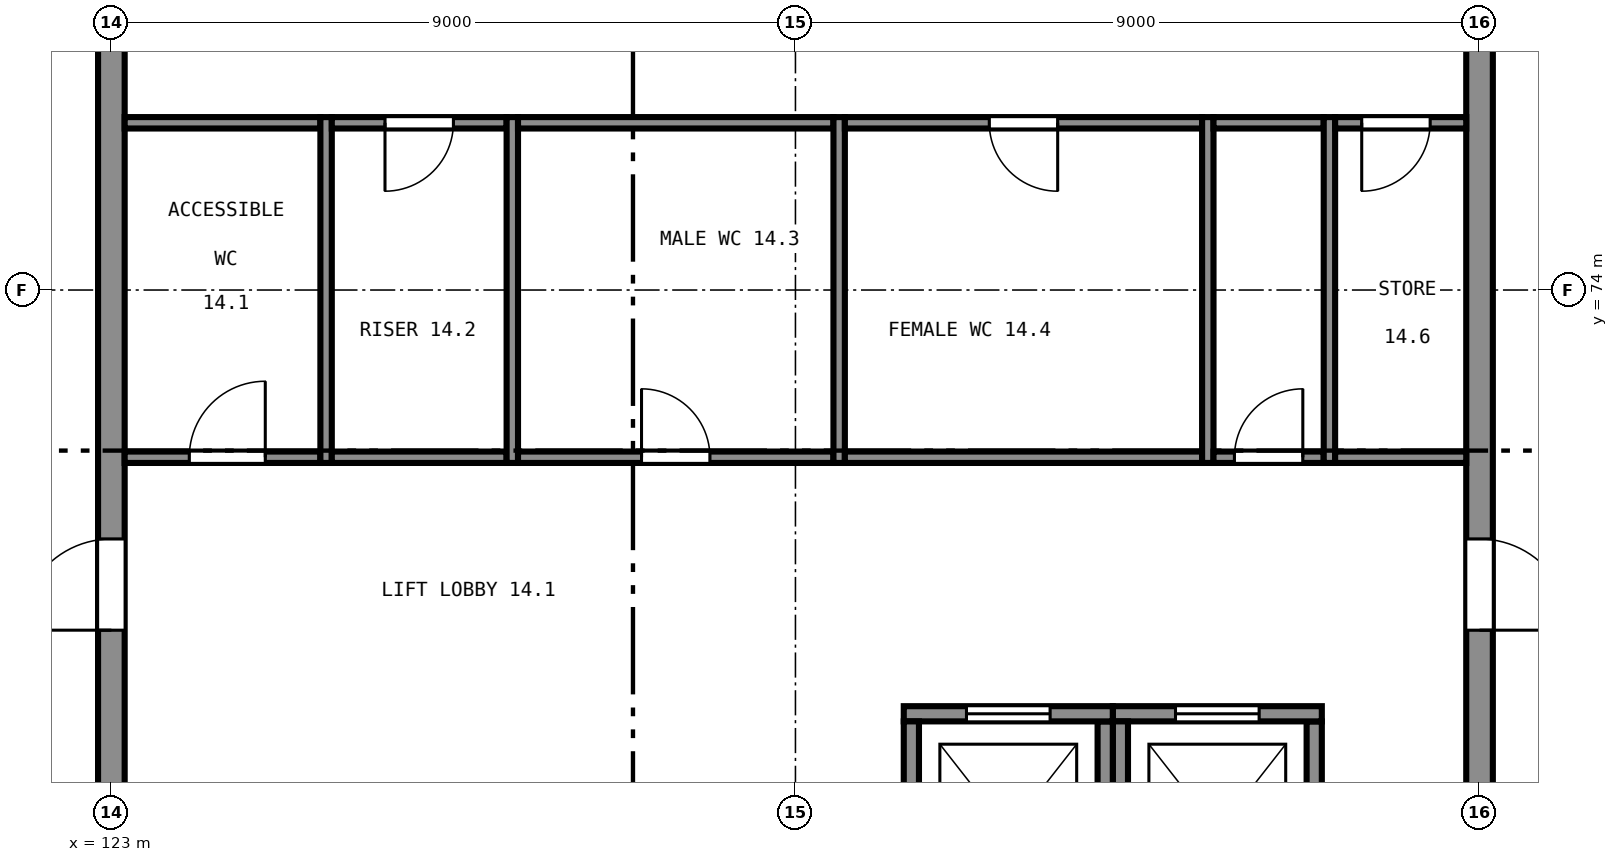
"""IFC4 building model, lengths in metres.
Left out: names, types, materials, properties, quantities, classifications, styles, units other than length and angle.
Written with IfcOpenShell. Run it as: python <this file> out.ifc"""

import sys

from ifc_helpers import new_model, si_unit, direction, frame, frame_2d, origin, place, context, subcontext, project, spatial, rectangle, extrude, element, fill, save


model = new_model("IFC4")
c1 = context("Model", 3, precision=1e-05, world=origin(), true_north=direction((0.0, 1.0)))
c2 = subcontext(c1, "Body", "Model", "MODEL_VIEW")
j1 = project(units=[si_unit("LENGTHUNIT", "METRE"), si_unit("PLANEANGLEUNIT", "RADIAN")], contexts=[c1])
p1 = place(None, origin())
s1 = spatial("IfcSite", under=j1, at=p1, CompositionType="ELEMENT")
p2 = place(p1, origin())
s2 = spatial("IfcBuilding", under=s1, at=p2, CompositionType="ELEMENT")
p3 = place(p2, frame((0.0, 0.0, 57.5)))
s3 = spatial("IfcBuildingStorey", under=s2, at=p3, CompositionType="ELEMENT", Elevation=57.5)
p4 = place(p3, frame((141.0, 65.175, 0.0), z_axis=(0.0, 0.0, 1.0), x_axis=(0.0, 1.0, 0.0)))
e1 = element("IfcWall", 1, at=p4, inside=s3, PredefinedType="SHEAR", context=c2, shape_type="SweptSolid", body=[
    extrude(rectangle(XDim=17.65, YDim=0.35, at=frame_2d((8.825, 0.0))), origin(), (0.0, 0.0, 1.0), 4.0),
])
p5 = place(p4, frame((4.35, 0.0, 0.0)))
e2 = element("IfcOpeningElement", 2, at=p5, cuts=e1, PredefinedType="OPENING", context=c2, shape_type="SweptSolid", body=[
    extrude(rectangle(XDim=1.2, YDim=2.1, at=frame_2d((0.6, 1.05))), frame((0.0, 0.185, 0.0), z_axis=(0.0, -1.0, 0.0), x_axis=(1.0, 0.0, 0.0)), (0.0, 0.0, 1.0), 0.37),
])
p6 = place(p4, frame((12.1, 0.0, 0.0)))
e3 = element("IfcOpeningElement", 3, at=p6, cuts=e1, PredefinedType="OPENING", context=c2, shape_type="SweptSolid", body=[
    extrude(rectangle(XDim=1.2, YDim=2.1, at=frame_2d((0.6, 1.05))), frame((0.0, 0.185, 0.0), z_axis=(0.0, -1.0, 0.0), x_axis=(1.0, 0.0, 0.0)), (0.0, 0.0, 1.0), 0.37),
])
p7 = place(p3, frame((123.0, 82.825, 0.0), z_axis=(0.0, 0.0, 1.0), x_axis=(0.0, -1.0, 0.0)))
e4 = element("IfcWall", 4, at=p7, inside=s3, PredefinedType="SHEAR", context=c2, shape_type="SweptSolid", body=[
    extrude(rectangle(XDim=17.65, YDim=0.35, at=frame_2d((8.825, 0.0))), origin(), (0.0, 0.0, 1.0), 4.0),
])
p8 = place(p7, frame((12.1, 0.0, 0.0)))
e5 = element("IfcOpeningElement", 5, at=p8, cuts=e4, PredefinedType="OPENING", context=c2, shape_type="SweptSolid", body=[
    extrude(rectangle(XDim=1.2, YDim=2.1, at=frame_2d((0.6, 1.05))), frame((0.0, 0.185, 0.0), z_axis=(0.0, -1.0, 0.0), x_axis=(1.0, 0.0, 0.0)), (0.0, 0.0, 1.0), 0.37),
])
p9 = place(p7, frame((4.35, 0.0, 0.0)))
e6 = element("IfcOpeningElement", 6, at=p9, cuts=e4, PredefinedType="OPENING", context=c2, shape_type="SweptSolid", body=[
    extrude(rectangle(XDim=1.2, YDim=2.1, at=frame_2d((0.6, 1.05))), frame((0.0, 0.185, 0.0), z_axis=(0.0, -1.0, 0.0), x_axis=(1.0, 0.0, 0.0)), (0.0, 0.0, 1.0), 0.37),
])
p10 = place(p3, frame((136.075, 65.425, 0.0), z_axis=(0.0, 0.0, 1.0), x_axis=(0.0, 1.0, 0.0)))
e7 = element("IfcWall", 7, at=p10, inside=s3, PredefinedType="SHEAR", context=c2, shape_type="SweptSolid", body=[
    extrude(rectangle(XDim=2.9, YDim=0.2, at=frame_2d((1.45, 0.0))), origin(), (0.0, 0.0, 1.0), 4.0),
])
p11 = place(p3, frame((136.175, 68.425, 0.0), z_axis=(0.0, 0.0, 1.0), x_axis=(-1.0, 0.0, 0.0)))
e8 = element("IfcWall", 8, at=p11, inside=s3, PredefinedType="SHEAR", context=c2, shape_type="SweptSolid", body=[
    extrude(rectangle(XDim=2.75, YDim=0.2, at=frame_2d((1.375, 0.0))), origin(), (0.0, 0.0, 1.0), 4.0),
])
p12 = place(p11, frame((0.825, 0.0, 0.0)))
e9 = element("IfcOpeningElement", 9, at=p12, cuts=e8, PredefinedType="OPENING", context=c2, shape_type="SweptSolid", body=[
    extrude(rectangle(XDim=1.1, YDim=2.1, at=frame_2d((0.55, 1.05))), frame((0.0, 0.11, 0.0), z_axis=(0.0, -1.0, 0.0), x_axis=(1.0, 0.0, 0.0)), (0.0, 0.0, 1.0), 0.22),
])
for number, where, z_axis, x_axis in (
    (10, (133.525, 68.325, 0.0), (0.0, 0.0, 1.0), (0.0, -1.0, 0.0)),
    (11, (138.825, 65.425, 0.0), (0.0, 0.0, 1.0), (0.0, 1.0, 0.0)),
):
    element("IfcWall", number, at=place(p3, frame(where, z_axis=z_axis, x_axis=x_axis)), inside=s3, PredefinedType="SHEAR", context=c2, shape_type="SweptSolid", body=[
        extrude(rectangle(XDim=2.9, YDim=0.2, at=frame_2d((1.45, 0.0))), origin(), (0.0, 0.0, 1.0), 4.0),
    ])
p13 = place(p3, frame((138.925, 68.425, 0.0), z_axis=(0.0, 0.0, 1.0), x_axis=(-1.0, 0.0, 0.0)))
e12 = element("IfcWall", 12, at=p13, inside=s3, PredefinedType="SHEAR", context=c2, shape_type="SweptSolid", body=[
    extrude(rectangle(XDim=2.75, YDim=0.2, at=frame_2d((1.375, 0.0))), origin(), (0.0, 0.0, 1.0), 4.0),
])
p14 = place(p13, frame((0.825, 0.0, 0.0)))
e13 = element("IfcOpeningElement", 13, at=p14, cuts=e12, PredefinedType="OPENING", context=c2, shape_type="SweptSolid", body=[
    extrude(rectangle(XDim=1.1, YDim=2.1, at=frame_2d((0.55, 1.05))), frame((0.0, 0.11, 0.0), z_axis=(0.0, -1.0, 0.0), x_axis=(1.0, 0.0, 0.0)), (0.0, 0.0, 1.0), 0.22),
])
p15 = place(p3, frame((136.275, 68.325, 0.0), z_axis=(0.0, 0.0, 1.0), x_axis=(0.0, -1.0, 0.0)))
e14 = element("IfcWall", 14, at=p15, inside=s3, PredefinedType="SHEAR", context=c2, shape_type="SweptSolid", body=[
    extrude(rectangle(XDim=2.9, YDim=0.2, at=frame_2d((1.45, 0.0))), origin(), (0.0, 0.0, 1.0), 4.0),
])
p16 = place(p3, frame((125.825, 71.725, 0.0), z_axis=(0.0, 0.0, 1.0), x_axis=(0.0, 1.0, 0.0)))
e15 = element("IfcWall", 15, at=p16, inside=s3, PredefinedType="PARTITIONING", context=c2, shape_type="SweptSolid", body=[
    extrude(rectangle(XDim=4.55, YDim=0.15, at=frame_2d((2.275, 0.0))), origin(), (0.0, 0.0, 1.0), 3.75),
])
p17 = place(p3, frame((123.175, 71.8, 0.0), z_axis=(0.0, 0.0, 1.0), x_axis=(1.0, 0.0, 0.0)))
e16 = element("IfcWall", 16, at=p17, inside=s3, PredefinedType="PARTITIONING", context=c2, shape_type="SweptSolid", body=[
    extrude(rectangle(XDim=2.575, YDim=0.15, at=frame_2d((1.288, 0.0))), origin(), (0.0, 0.0, 1.0), 3.75),
])
p18 = place(p17, frame((0.85, 0.0, 0.0)))
e17 = element("IfcOpeningElement", 17, at=p18, cuts=e16, PredefinedType="OPENING", context=c2, shape_type="SweptSolid", body=[
    extrude(rectangle(XDim=1.0, YDim=2.1, at=frame_2d((0.5, 1.05))), frame((0.0, 0.085, 0.0), z_axis=(0.0, -1.0, 0.0), x_axis=(1.0, 0.0, 0.0)), (0.0, 0.0, 1.0), 0.17),
])
p19 = place(p3, frame((123.175, 76.2, 0.0), z_axis=(0.0, 0.0, 1.0), x_axis=(1.0, 0.0, 0.0)))
e18 = element("IfcWall", 18, at=p19, inside=s3, PredefinedType="PARTITIONING", context=c2, shape_type="SweptSolid", body=[
    extrude(rectangle(XDim=2.575, YDim=0.15, at=frame_2d((1.288, 0.0))), origin(), (0.0, 0.0, 1.0), 3.75),
])
p20 = place(p3, frame((128.275, 71.725, 0.0), z_axis=(0.0, 0.0, 1.0), x_axis=(0.0, 1.0, 0.0)))
e19 = element("IfcWall", 19, at=p20, inside=s3, PredefinedType="PARTITIONING", context=c2, shape_type="SweptSolid", body=[
    extrude(rectangle(XDim=4.55, YDim=0.15, at=frame_2d((2.275, 0.0))), origin(), (0.0, 0.0, 1.0), 3.75),
])
p21 = place(p3, frame((125.9, 71.8, 0.0), z_axis=(0.0, 0.0, 1.0), x_axis=(1.0, 0.0, 0.0)))
e20 = element("IfcWall", 20, at=p21, inside=s3, PredefinedType="PARTITIONING", context=c2, shape_type="SweptSolid", body=[
    extrude(rectangle(XDim=2.3, YDim=0.15, at=frame_2d((1.15, 0.0))), origin(), (0.0, 0.0, 1.0), 3.75),
])
p22 = place(p3, frame((125.9, 76.2, 0.0), z_axis=(0.0, 0.0, 1.0), x_axis=(1.0, 0.0, 0.0)))
e21 = element("IfcWall", 21, at=p22, inside=s3, PredefinedType="PARTITIONING", context=c2, shape_type="SweptSolid", body=[
    extrude(rectangle(XDim=2.3, YDim=0.15, at=frame_2d((1.15, 0.0))), origin(), (0.0, 0.0, 1.0), 3.75),
])
p23 = place(p22, frame((0.7, 0.0, 0.0)))
e22 = element("IfcOpeningElement", 22, at=p23, cuts=e21, PredefinedType="OPENING", context=c2, shape_type="SweptSolid", body=[
    extrude(rectangle(XDim=0.9, YDim=2.1, at=frame_2d((0.45, 1.05))), frame((0.0, 0.085, 0.0), z_axis=(0.0, -1.0, 0.0), x_axis=(1.0, 0.0, 0.0)), (0.0, 0.0, 1.0), 0.17),
])
p24 = place(p3, frame((132.575, 71.725, 0.0), z_axis=(0.0, 0.0, 1.0), x_axis=(0.0, 1.0, 0.0)))
e23 = element("IfcWall", 23, at=p24, inside=s3, PredefinedType="PARTITIONING", context=c2, shape_type="SweptSolid", body=[
    extrude(rectangle(XDim=4.55, YDim=0.15, at=frame_2d((2.275, 0.0))), origin(), (0.0, 0.0, 1.0), 3.75),
])
p25 = place(p3, frame((128.35, 71.8, 0.0), z_axis=(0.0, 0.0, 1.0), x_axis=(1.0, 0.0, 0.0)))
e24 = element("IfcWall", 24, at=p25, inside=s3, PredefinedType="PARTITIONING", context=c2, shape_type="SweptSolid", body=[
    extrude(rectangle(XDim=4.15, YDim=0.15, at=frame_2d((2.075, 0.0))), origin(), (0.0, 0.0, 1.0), 3.75),
])
p26 = place(p25, frame((1.625, 0.0, 0.0)))
e25 = element("IfcOpeningElement", 25, at=p26, cuts=e24, PredefinedType="OPENING", context=c2, shape_type="SweptSolid", body=[
    extrude(rectangle(XDim=0.9, YDim=2.1, at=frame_2d((0.45, 1.05))), frame((0.0, 0.085, 0.0), z_axis=(0.0, -1.0, 0.0), x_axis=(1.0, 0.0, 0.0)), (0.0, 0.0, 1.0), 0.17),
])
p27 = place(p3, frame((128.35, 76.2, 0.0), z_axis=(0.0, 0.0, 1.0), x_axis=(1.0, 0.0, 0.0)))
e26 = element("IfcWall", 26, at=p27, inside=s3, PredefinedType="PARTITIONING", context=c2, shape_type="SweptSolid", body=[
    extrude(rectangle(XDim=4.15, YDim=0.15, at=frame_2d((2.075, 0.0))), origin(), (0.0, 0.0, 1.0), 3.75),
])
p28 = place(p3, frame((137.425, 71.725, 0.0), z_axis=(0.0, 0.0, 1.0), x_axis=(0.0, 1.0, 0.0)))
e27 = element("IfcWall", 27, at=p28, inside=s3, PredefinedType="PARTITIONING", context=c2, shape_type="SweptSolid", body=[
    extrude(rectangle(XDim=4.55, YDim=0.15, at=frame_2d((2.275, 0.0))), origin(), (0.0, 0.0, 1.0), 3.75),
])
p29 = place(p3, frame((132.65, 71.8, 0.0), z_axis=(0.0, 0.0, 1.0), x_axis=(1.0, 0.0, 0.0)))
e28 = element("IfcWall", 28, at=p29, inside=s3, PredefinedType="PARTITIONING", context=c2, shape_type="SweptSolid", body=[
    extrude(rectangle(XDim=4.7, YDim=0.15, at=frame_2d((2.35, 0.0))), origin(), (0.0, 0.0, 1.0), 3.75),
])
p30 = place(p3, frame((132.65, 76.2, 0.0), z_axis=(0.0, 0.0, 1.0), x_axis=(1.0, 0.0, 0.0)))
e29 = element("IfcWall", 29, at=p30, inside=s3, PredefinedType="PARTITIONING", context=c2, shape_type="SweptSolid", body=[
    extrude(rectangle(XDim=4.7, YDim=0.15, at=frame_2d((2.35, 0.0))), origin(), (0.0, 0.0, 1.0), 3.75),
])
p31 = place(p30, frame((1.9, 0.0, 0.0)))
e30 = element("IfcOpeningElement", 30, at=p31, cuts=e29, PredefinedType="OPENING", context=c2, shape_type="SweptSolid", body=[
    extrude(rectangle(XDim=0.9, YDim=2.1, at=frame_2d((0.45, 1.05))), frame((0.0, 0.085, 0.0), z_axis=(0.0, -1.0, 0.0), x_axis=(1.0, 0.0, 0.0)), (0.0, 0.0, 1.0), 0.17),
])
p32 = place(p3, frame((139.025, 71.725, 0.0), z_axis=(0.0, 0.0, 1.0), x_axis=(0.0, 1.0, 0.0)))
e31 = element("IfcWall", 31, at=p32, inside=s3, PredefinedType="PARTITIONING", context=c2, shape_type="SweptSolid", body=[
    extrude(rectangle(XDim=4.55, YDim=0.15, at=frame_2d((2.275, 0.0))), origin(), (0.0, 0.0, 1.0), 3.75),
])
p33 = place(p3, frame((137.5, 71.8, 0.0), z_axis=(0.0, 0.0, 1.0), x_axis=(1.0, 0.0, 0.0)))
e32 = element("IfcWall", 32, at=p33, inside=s3, PredefinedType="PARTITIONING", context=c2, shape_type="SweptSolid", body=[
    extrude(rectangle(XDim=1.45, YDim=0.15, at=frame_2d((0.725, 0.0))), origin(), (0.0, 0.0, 1.0), 3.75),
])
p34 = place(p33, frame((0.275, 0.0, 0.0)))
e33 = element("IfcOpeningElement", 33, at=p34, cuts=e32, PredefinedType="OPENING", context=c2, shape_type="SweptSolid", body=[
    extrude(rectangle(XDim=0.9, YDim=2.1, at=frame_2d((0.45, 1.05))), frame((0.0, 0.085, 0.0), z_axis=(0.0, -1.0, 0.0), x_axis=(1.0, 0.0, 0.0)), (0.0, 0.0, 1.0), 0.17),
])
p35 = place(p3, frame((137.5, 76.2, 0.0), z_axis=(0.0, 0.0, 1.0), x_axis=(1.0, 0.0, 0.0)))
e34 = element("IfcWall", 34, at=p35, inside=s3, PredefinedType="PARTITIONING", context=c2, shape_type="SweptSolid", body=[
    extrude(rectangle(XDim=1.45, YDim=0.15, at=frame_2d((0.725, 0.0))), origin(), (0.0, 0.0, 1.0), 3.75),
])
p36 = place(p3, frame((139.1, 71.8, 0.0), z_axis=(0.0, 0.0, 1.0), x_axis=(1.0, 0.0, 0.0)))
e35 = element("IfcWall", 35, at=p36, inside=s3, PredefinedType="PARTITIONING", context=c2, shape_type="SweptSolid", body=[
    extrude(rectangle(XDim=1.725, YDim=0.15, at=frame_2d((0.862, 0.0))), origin(), (0.0, 0.0, 1.0), 3.75),
])
p37 = place(p3, frame((139.1, 76.2, 0.0), z_axis=(0.0, 0.0, 1.0), x_axis=(1.0, 0.0, 0.0)))
e36 = element("IfcWall", 36, at=p37, inside=s3, PredefinedType="PARTITIONING", context=c2, shape_type="SweptSolid", body=[
    extrude(rectangle(XDim=1.725, YDim=0.15, at=frame_2d((0.862, 0.0))), origin(), (0.0, 0.0, 1.0), 3.75),
])
p38 = place(p37, frame((0.35, 0.0, 0.0)))
e37 = element("IfcOpeningElement", 37, at=p38, cuts=e36, PredefinedType="OPENING", context=c2, shape_type="SweptSolid", body=[
    extrude(rectangle(XDim=0.9, YDim=2.1, at=frame_2d((0.45, 1.05))), frame((0.0, 0.085, 0.0), z_axis=(0.0, -1.0, 0.0), x_axis=(1.0, 0.0, 0.0)), (0.0, 0.0, 1.0), 0.17),
])
p39 = place(p12, origin())
e38 = element("IfcDoor", 38, at=p39, inside=s3, OperationType="SLIDING_TO_LEFT", PredefinedType="DOOR", context=c2, shape_type="SweptSolid", body=[
    extrude(rectangle(XDim=1.1, YDim=2.1, at=frame_2d((0.55, 1.05))), frame((0.0, 0.025, 0.0), z_axis=(0.0, -1.0, 0.0), x_axis=(1.0, 0.0, 0.0)), (0.0, 0.0, 1.0), 0.05),
])
fill(e9, e38)
p40 = place(p14, origin())
e39 = element("IfcDoor", 39, at=p40, inside=s3, OperationType="SLIDING_TO_LEFT", PredefinedType="DOOR", context=c2, shape_type="SweptSolid", body=[
    extrude(rectangle(XDim=1.1, YDim=2.1, at=frame_2d((0.55, 1.05))), frame((0.0, 0.025, 0.0), z_axis=(0.0, -1.0, 0.0), x_axis=(1.0, 0.0, 0.0)), (0.0, 0.0, 1.0), 0.05),
])
fill(e13, e39)
p41 = place(p8, frame((1.2, 0.0, 0.0), z_axis=(0.0, 0.0, 1.0), x_axis=(-1.0, 0.0, 0.0)))
e40 = element("IfcDoor", 40, at=p41, inside=s3, OperationType="SINGLE_SWING_RIGHT", PredefinedType="DOOR", context=c2, shape_type="SweptSolid", body=[
    extrude(rectangle(XDim=1.2, YDim=2.1, at=frame_2d((0.6, 1.05))), frame((0.0, 0.025, 0.0), z_axis=(0.0, -1.0, 0.0), x_axis=(1.0, 0.0, 0.0)), (0.0, 0.0, 1.0), 0.05),
])
fill(e5, e40)
p42 = place(p5, frame((1.2, 0.0, 0.0), z_axis=(0.0, 0.0, 1.0), x_axis=(-1.0, 0.0, 0.0)))
e41 = element("IfcDoor", 41, at=p42, inside=s3, OperationType="SINGLE_SWING_LEFT", PredefinedType="DOOR", context=c2, shape_type="SweptSolid", body=[
    extrude(rectangle(XDim=1.2, YDim=2.1, at=frame_2d((0.6, 1.05))), frame((0.0, 0.025, 0.0), z_axis=(0.0, -1.0, 0.0), x_axis=(1.0, 0.0, 0.0)), (0.0, 0.0, 1.0), 0.05),
])
fill(e2, e41)
p43 = place(p18, origin())
e42 = element("IfcDoor", 42, at=p43, inside=s3, OperationType="SINGLE_SWING_LEFT", PredefinedType="DOOR", context=c2, shape_type="SweptSolid", body=[
    extrude(rectangle(XDim=1.0, YDim=2.1, at=frame_2d((0.5, 1.05))), frame((0.0, 0.025, 0.0), z_axis=(0.0, -1.0, 0.0), x_axis=(1.0, 0.0, 0.0)), (0.0, 0.0, 1.0), 0.05),
])
fill(e17, e42)
p44 = place(p23, frame((0.9, 0.0, 0.0), z_axis=(0.0, 0.0, 1.0), x_axis=(-1.0, 0.0, 0.0)))
e43 = element("IfcDoor", 43, at=p44, inside=s3, OperationType="SINGLE_SWING_LEFT", PredefinedType="DOOR", context=c2, shape_type="SweptSolid", body=[
    extrude(rectangle(XDim=0.9, YDim=2.1, at=frame_2d((0.45, 1.05))), frame((0.0, 0.025, 0.0), z_axis=(0.0, -1.0, 0.0), x_axis=(1.0, 0.0, 0.0)), (0.0, 0.0, 1.0), 0.05),
])
fill(e22, e43)
p45 = place(p26, origin())
e44 = element("IfcDoor", 44, at=p45, inside=s3, OperationType="SINGLE_SWING_RIGHT", PredefinedType="DOOR", context=c2, shape_type="SweptSolid", body=[
    extrude(rectangle(XDim=0.9, YDim=2.1, at=frame_2d((0.45, 1.05))), frame((0.0, 0.025, 0.0), z_axis=(0.0, -1.0, 0.0), x_axis=(1.0, 0.0, 0.0)), (0.0, 0.0, 1.0), 0.05),
])
fill(e25, e44)
p46 = place(p31, frame((0.9, 0.0, 0.0), z_axis=(0.0, 0.0, 1.0), x_axis=(-1.0, 0.0, 0.0)))
e45 = element("IfcDoor", 45, at=p46, inside=s3, OperationType="SINGLE_SWING_RIGHT", PredefinedType="DOOR", context=c2, shape_type="SweptSolid", body=[
    extrude(rectangle(XDim=0.9, YDim=2.1, at=frame_2d((0.45, 1.05))), frame((0.0, 0.025, 0.0), z_axis=(0.0, -1.0, 0.0), x_axis=(1.0, 0.0, 0.0)), (0.0, 0.0, 1.0), 0.05),
])
fill(e30, e45)
p47 = place(p34, origin())
e46 = element("IfcDoor", 46, at=p47, inside=s3, OperationType="SINGLE_SWING_LEFT", PredefinedType="DOOR", context=c2, shape_type="SweptSolid", body=[
    extrude(rectangle(XDim=0.9, YDim=2.1, at=frame_2d((0.45, 1.05))), frame((0.0, 0.025, 0.0), z_axis=(0.0, -1.0, 0.0), x_axis=(1.0, 0.0, 0.0)), (0.0, 0.0, 1.0), 0.05),
])
fill(e33, e46)
p48 = place(p38, frame((0.9, 0.0, 0.0), z_axis=(0.0, 0.0, 1.0), x_axis=(-1.0, 0.0, 0.0)))
e47 = element("IfcDoor", 47, at=p48, inside=s3, OperationType="SINGLE_SWING_LEFT", PredefinedType="DOOR", context=c2, shape_type="SweptSolid", body=[
    extrude(rectangle(XDim=0.9, YDim=2.1, at=frame_2d((0.45, 1.05))), frame((0.0, 0.025, 0.0), z_axis=(0.0, -1.0, 0.0), x_axis=(1.0, 0.0, 0.0)), (0.0, 0.0, 1.0), 0.05),
])
fill(e37, e47)
save(model, sys.argv[1])
